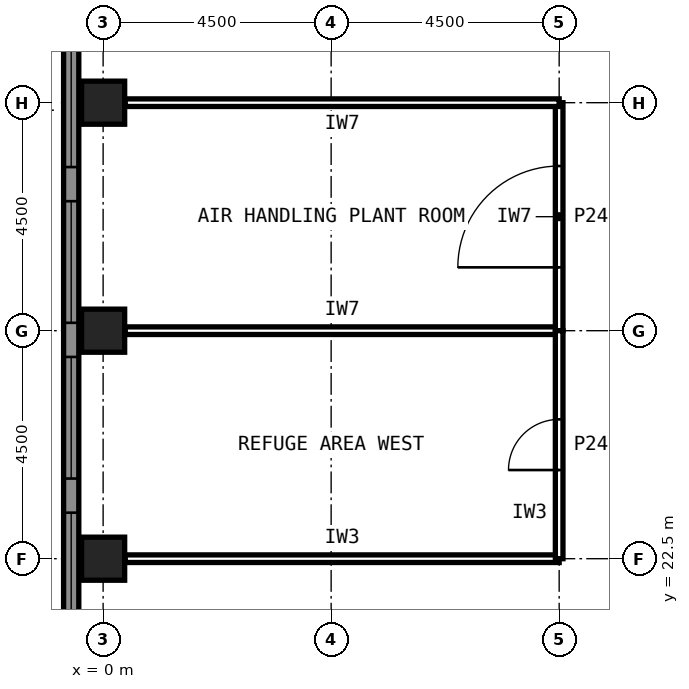
"""IFC4 building model, lengths in metres.
Left out: names, types, materials, properties, quantities, classifications, styles, units other than length and angle.
Written with IfcOpenShell. Run it as: python <this file> out.ifc"""

import sys

from ifc_helpers import new_model, si_unit, direction, frame, frame_2d, origin, origin_2d, place, context, subcontext, project, spatial, rectangle, hollow_rectangle, extrude, element, fill, save


model = new_model("IFC4")
c1 = context("Model", 3, precision=1e-05, world=origin(), true_north=direction((0.0, 1.0)))
c2 = subcontext(c1, "Body", "Model", "MODEL_VIEW")
j1 = project(units=[si_unit("LENGTHUNIT", "METRE"), si_unit("PLANEANGLEUNIT", "RADIAN")], contexts=[c1])
p1 = place(None, origin())
s1 = spatial("IfcSite", under=j1, at=p1, CompositionType="ELEMENT")
p2 = place(p1, origin())
s2 = spatial("IfcBuilding", under=s1, at=p2, CompositionType="ELEMENT")
p3 = place(p2, frame((0.0, 0.0, 104.6)))
s3 = spatial("IfcBuildingStorey", under=s2, at=p3, CompositionType="ELEMENT", Elevation=104.6)
for number, where, z_axis, x_axis in (
    (1, (0.0, 31.5, 0.0), (0.0, 0.0, 1.0), (1.0, 0.0, 0.0)),
    (2, (0.0, 27.0, 0.0), (0.0, 0.0, 1.0), (1.0, 0.0, 0.0)),
    (3, (0.0, 22.5, 0.0), (0.0, 0.0, 1.0), (1.0, 0.0, 0.0)),
):
    element("IfcColumn", number, at=place(p3, frame(where, z_axis=z_axis, x_axis=x_axis)), inside=s3, PredefinedType="COLUMN", context=c2, shape_type="SweptSolid", body=[
        extrude(hollow_rectangle(XDim=0.85, YDim=0.85, WallThickness=0.05, at=origin_2d()), origin(), (0.0, 0.0, 1.0), 6.0),
    ])
p4 = place(p3, frame((-0.63, 17.598, 0.0), z_axis=(0.0, 0.0, 1.0), x_axis=(0.0, 1.0, 0.0)))
e4 = element("IfcWall", 4, at=p4, inside=s3, PredefinedType="SOLIDWALL", context=c2, shape_type="SweptSolid", body=[
    extrude(rectangle(XDim=27.663, YDim=0.3, at=frame_2d((13.832, 0.0))), origin(), (0.0, 0.0, 1.0), 6.0),
])
p5 = place(p4, frame((0.337, 0.0, 1.2)))
e5 = element("IfcOpeningElement", 5, at=p5, cuts=e4, PredefinedType="OPENING", context=c2, shape_type="SweptSolid", body=[
    extrude(rectangle(XDim=2.4, YDim=3.0, at=frame_2d((1.2, 1.5))), frame((0.0, 0.16, 0.0), z_axis=(0.0, -1.0, 0.0), x_axis=(1.0, 0.0, 0.0)), (0.0, 0.0, 1.0), 0.32),
])
p6 = place(p4, frame((3.411, 0.0, 1.2)))
e6 = element("IfcOpeningElement", 6, at=p6, cuts=e4, PredefinedType="OPENING", context=c2, shape_type="SweptSolid", body=[
    extrude(rectangle(XDim=2.4, YDim=3.0, at=frame_2d((1.2, 1.5))), frame((0.0, 0.16, 0.0), z_axis=(0.0, -1.0, 0.0), x_axis=(1.0, 0.0, 0.0)), (0.0, 0.0, 1.0), 0.32),
])
p7 = place(p4, frame((6.484, 0.0, 1.2)))
e7 = element("IfcOpeningElement", 7, at=p7, cuts=e4, PredefinedType="OPENING", context=c2, shape_type="SweptSolid", body=[
    extrude(rectangle(XDim=2.4, YDim=3.0, at=frame_2d((1.2, 1.5))), frame((0.0, 0.16, 0.0), z_axis=(0.0, -1.0, 0.0), x_axis=(1.0, 0.0, 0.0)), (0.0, 0.0, 1.0), 0.32),
])
p8 = place(p4, frame((9.558, 0.0, 1.2)))
e8 = element("IfcOpeningElement", 8, at=p8, cuts=e4, PredefinedType="OPENING", context=c2, shape_type="SweptSolid", body=[
    extrude(rectangle(XDim=2.4, YDim=3.0, at=frame_2d((1.2, 1.5))), frame((0.0, 0.16, 0.0), z_axis=(0.0, -1.0, 0.0), x_axis=(1.0, 0.0, 0.0)), (0.0, 0.0, 1.0), 0.32),
])
p9 = place(p4, frame((12.632, 0.0, 1.2)))
e9 = element("IfcOpeningElement", 9, at=p9, cuts=e4, PredefinedType="OPENING", context=c2, shape_type="SweptSolid", body=[
    extrude(rectangle(XDim=2.4, YDim=3.0, at=frame_2d((1.2, 1.5))), frame((0.0, 0.16, 0.0), z_axis=(0.0, -1.0, 0.0), x_axis=(1.0, 0.0, 0.0)), (0.0, 0.0, 1.0), 0.32),
])
p10 = place(p4, frame((15.705, 0.0, 1.2)))
e10 = element("IfcOpeningElement", 10, at=p10, cuts=e4, PredefinedType="OPENING", context=c2, shape_type="SweptSolid", body=[
    extrude(rectangle(XDim=2.4, YDim=3.0, at=frame_2d((1.2, 1.5))), frame((0.0, 0.16, 0.0), z_axis=(0.0, -1.0, 0.0), x_axis=(1.0, 0.0, 0.0)), (0.0, 0.0, 1.0), 0.32),
])
p11 = place(p4, frame((18.779, 0.0, 1.2)))
e11 = element("IfcOpeningElement", 11, at=p11, cuts=e4, PredefinedType="OPENING", context=c2, shape_type="SweptSolid", body=[
    extrude(rectangle(XDim=2.4, YDim=3.0, at=frame_2d((1.2, 1.5))), frame((0.0, 0.16, 0.0), z_axis=(0.0, -1.0, 0.0), x_axis=(1.0, 0.0, 0.0)), (0.0, 0.0, 1.0), 0.32),
])
p12 = place(p4, frame((21.853, 0.0, 1.2)))
e12 = element("IfcOpeningElement", 12, at=p12, cuts=e4, PredefinedType="OPENING", context=c2, shape_type="SweptSolid", body=[
    extrude(rectangle(XDim=2.4, YDim=3.0, at=frame_2d((1.2, 1.5))), frame((0.0, 0.16, 0.0), z_axis=(0.0, -1.0, 0.0), x_axis=(1.0, 0.0, 0.0)), (0.0, 0.0, 1.0), 0.32),
])
p13 = place(p4, frame((24.927, 0.0, 1.2)))
e13 = element("IfcOpeningElement", 13, at=p13, cuts=e4, PredefinedType="OPENING", context=c2, shape_type="SweptSolid", body=[
    extrude(rectangle(XDim=2.4, YDim=3.0, at=frame_2d((1.2, 1.5))), frame((0.0, 0.16, 0.0), z_axis=(0.0, -1.0, 0.0), x_axis=(1.0, 0.0, 0.0)), (0.0, 0.0, 1.0), 0.32),
])
p14 = place(p3, frame((0.435, 27.0, 0.0), z_axis=(0.0, 0.0, 1.0), x_axis=(1.0, 0.0, 0.0)))
e14 = element("IfcWall", 14, at=p14, inside=s3, PredefinedType="PARTITIONING", context=c2, shape_type="SweptSolid", body=[
    extrude(rectangle(XDim=8.565, YDim=0.15, at=frame_2d((4.282, 0.0))), origin(), (0.0, 0.0, 1.0), 4.72),
])
p15 = place(p3, frame((9.0, 27.0, 0.0), z_axis=(0.0, 0.0, 1.0), x_axis=(0.0, 1.0, 0.0)))
e15 = element("IfcWall", 15, at=p15, inside=s3, PredefinedType="PARTITIONING", context=c2, shape_type="SweptSolid", body=[
    extrude(rectangle(XDim=4.5, YDim=0.15, at=frame_2d((2.25, 0.0))), origin(), (0.0, 0.0, 1.0), 5.82),
])
p16 = place(p15, frame((1.25, 0.0, 0.0)))
e16 = element("IfcOpeningElement", 16, at=p16, cuts=e15, PredefinedType="OPENING", context=c2, shape_type="SweptSolid", body=[
    extrude(rectangle(XDim=2.0, YDim=2.4, at=frame_2d((1.0, 1.2))), frame((0.0, 0.085, 0.0), z_axis=(0.0, -1.0, 0.0), x_axis=(1.0, 0.0, 0.0)), (0.0, 0.0, 1.0), 0.17),
])
for number, where, z_axis, x_axis in (
    (17, (9.0, 31.5, 0.0), (0.0, 0.0, 1.0), (-1.0, 0.0, 0.0)),
    (18, (0.435, 22.5, 0.0), (0.0, 0.0, 1.0), (1.0, 0.0, 0.0)),
):
    element("IfcWall", number, at=place(p3, frame(where, z_axis=z_axis, x_axis=x_axis)), inside=s3, PredefinedType="PARTITIONING", context=c2, shape_type="SweptSolid", body=[
        extrude(rectangle(XDim=8.565, YDim=0.15, at=frame_2d((4.282, 0.0))), origin(), (0.0, 0.0, 1.0), 4.72),
    ])
p17 = place(p3, frame((9.0, 22.5, 0.0), z_axis=(0.0, 0.0, 1.0), x_axis=(0.0, 1.0, 0.0)))
e19 = element("IfcWall", 19, at=p17, inside=s3, PredefinedType="PARTITIONING", context=c2, shape_type="SweptSolid", body=[
    extrude(rectangle(XDim=4.5, YDim=0.15, at=frame_2d((2.25, 0.0))), origin(), (0.0, 0.0, 1.0), 5.82),
])
p18 = place(p17, frame((1.75, 0.0, 0.0)))
e20 = element("IfcOpeningElement", 20, at=p18, cuts=e19, PredefinedType="OPENING", context=c2, shape_type="SweptSolid", body=[
    extrude(rectangle(XDim=1.0, YDim=2.1, at=frame_2d((0.5, 1.05))), frame((0.0, 0.085, 0.0), z_axis=(0.0, -1.0, 0.0), x_axis=(1.0, 0.0, 0.0)), (0.0, 0.0, 1.0), 0.17),
])
p19 = place(p6, origin())
e21 = element("IfcWindow", 21, at=p19, inside=s3, PartitioningType="SINGLE_PANEL", PredefinedType="USERDEFINED", context=c2, shape_type="SweptSolid", body=[
    extrude(rectangle(XDim=2.4, YDim=3.0, at=frame_2d((1.2, 1.5))), frame((0.0, 0.03, 0.0), z_axis=(0.0, -1.0, 0.0), x_axis=(1.0, 0.0, 0.0)), (0.0, 0.0, 1.0), 0.06),
])
fill(e6, e21)
p20 = place(p7, origin())
e22 = element("IfcWindow", 22, at=p20, inside=s3, PartitioningType="SINGLE_PANEL", PredefinedType="USERDEFINED", context=c2, shape_type="SweptSolid", body=[
    extrude(rectangle(XDim=2.4, YDim=3.0, at=frame_2d((1.2, 1.5))), frame((0.0, 0.03, 0.0), z_axis=(0.0, -1.0, 0.0), x_axis=(1.0, 0.0, 0.0)), (0.0, 0.0, 1.0), 0.06),
])
fill(e7, e22)
p21 = place(p8, origin())
e23 = element("IfcWindow", 23, at=p21, inside=s3, PartitioningType="SINGLE_PANEL", PredefinedType="USERDEFINED", context=c2, shape_type="SweptSolid", body=[
    extrude(rectangle(XDim=2.4, YDim=3.0, at=frame_2d((1.2, 1.5))), frame((0.0, 0.03, 0.0), z_axis=(0.0, -1.0, 0.0), x_axis=(1.0, 0.0, 0.0)), (0.0, 0.0, 1.0), 0.06),
])
fill(e8, e23)
p22 = place(p9, origin())
e24 = element("IfcWindow", 24, at=p22, inside=s3, PartitioningType="SINGLE_PANEL", PredefinedType="USERDEFINED", context=c2, shape_type="SweptSolid", body=[
    extrude(rectangle(XDim=2.4, YDim=3.0, at=frame_2d((1.2, 1.5))), frame((0.0, 0.03, 0.0), z_axis=(0.0, -1.0, 0.0), x_axis=(1.0, 0.0, 0.0)), (0.0, 0.0, 1.0), 0.06),
])
fill(e9, e24)
p23 = place(p16, origin())
e25 = element("IfcDoor", 25, at=p23, inside=s3, OperationType="SINGLE_SWING_LEFT", PredefinedType="DOOR", context=c2, shape_type="SweptSolid", body=[
    extrude(rectangle(XDim=2.0, YDim=2.4, at=frame_2d((1.0, 1.2))), frame((0.0, 0.025, 0.0), z_axis=(0.0, -1.0, 0.0), x_axis=(1.0, 0.0, 0.0)), (0.0, 0.0, 1.0), 0.05),
])
fill(e16, e25)
p24 = place(p18, origin())
e26 = element("IfcDoor", 26, at=p24, inside=s3, OperationType="SINGLE_SWING_LEFT", PredefinedType="DOOR", context=c2, shape_type="SweptSolid", body=[
    extrude(rectangle(XDim=1.0, YDim=2.1, at=frame_2d((0.5, 1.05))), frame((0.0, 0.025, 0.0), z_axis=(0.0, -1.0, 0.0), x_axis=(1.0, 0.0, 0.0)), (0.0, 0.0, 1.0), 0.05),
])
fill(e20, e26)
save(model, sys.argv[1])
